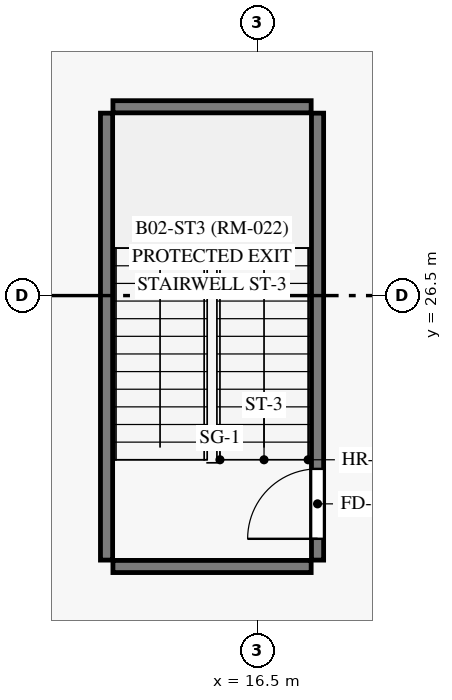
"""IFC4 building model, lengths in metres.
Left out: names, types, materials, properties, quantities, classifications, styles, units other than length and angle.
Written with IfcOpenShell. Run it as: python <this file> out.ifc"""

import sys

from ifc_helpers import new_model, si_unit, direction, frame, frame_2d, origin, origin_with_axes, place, context, subcontext, project, spatial, rectangle, extrude, source, transform, mapped, element, fill, save


model = new_model("IFC4")
c1 = context("Model", 3, precision=1e-05, world=origin(), true_north=direction((0.0, 1.0)))
c2 = subcontext(c1, "Body", "Model", "MODEL_VIEW")
j1 = project(units=[si_unit("LENGTHUNIT", "METRE"), si_unit("PLANEANGLEUNIT", "RADIAN")], contexts=[c1])
p1 = place(None, origin())
s1 = spatial("IfcSite", under=j1, at=p1, CompositionType="ELEMENT")
p2 = place(p1, origin())
s2 = spatial("IfcBuilding", under=s1, at=p2, CompositionType="ELEMENT")
p3 = place(p2, frame((0.0, 0.0, -8.4)))
s3 = spatial("IfcBuildingStorey", under=s2, at=p3, CompositionType="ELEMENT", Elevation=-8.4)
p4 = place(p3, frame((14.015, 22.15, 0.0), z_axis=(0.0, 0.0, 1.0), x_axis=(0.0, 1.0, 0.0)))
e1 = element("IfcWall", 1, at=p4, inside=s3, PredefinedType="SHEAR", context=c2, shape_type="SweptSolid", body=[
    extrude(rectangle(XDim=7.35, YDim=0.2, at=frame_2d((3.675, 0.0))), origin(), (0.0, 0.0, 1.0), 3.85),
])
p5 = place(p3, frame((17.485, 22.15, 0.0), z_axis=(0.0, 0.0, 1.0), x_axis=(0.0, 1.0, 0.0)))
e2 = element("IfcWall", 2, at=p5, inside=s3, PredefinedType="SHEAR", context=c2, shape_type="SweptSolid", body=[
    extrude(rectangle(XDim=7.35, YDim=0.2, at=frame_2d((3.675, 0.0))), origin(), (0.0, 0.0, 1.0), 3.85),
])
p6 = place(p5, frame((0.35, 0.0, 0.0)))
e3 = element("IfcOpeningElement", 3, at=p6, cuts=e2, PredefinedType="OPENING", context=c2, shape_type="SweptSolid", body=[
    extrude(rectangle(XDim=1.15, YDim=2.15, at=frame_2d((0.575, 1.075))), frame((0.0, 0.11, 0.0), z_axis=(0.0, -1.0, 0.0), x_axis=(1.0, 0.0, 0.0)), (0.0, 0.0, 1.0), 0.22),
])
for number, where, z_axis, x_axis in (
    (4, (14.12, 22.045, 0.0), (0.0, 0.0, 1.0), (1.0, 0.0, 0.0)),
    (5, (14.12, 29.605, 0.0), (0.0, 0.0, 1.0), (1.0, 0.0, 0.0)),
):
    element("IfcWall", number, at=place(p3, frame(where, z_axis=z_axis, x_axis=x_axis)), inside=s3, PredefinedType="SHEAR", context=c2, shape_type="SweptSolid", body=[
        extrude(rectangle(XDim=3.26, YDim=0.2, at=frame_2d((1.63, 0.0))), origin(), (0.0, 0.0, 1.0), 3.85),
    ])
m1 = source(origin_with_axes(), c2, "Body", "SweptSolid", [
    extrude(rectangle(XDim=1.15, YDim=2.15, at=frame_2d((0.575, 1.075))), frame((0.0, 0.025, 0.0), z_axis=(0.0, -1.0, 0.0), x_axis=(1.0, 0.0, 0.0)), (0.0, 0.0, 1.0), 0.05),
])
p7 = place(p6, origin())
e6 = element("IfcDoor", 6, at=p7, inside=s3, OperationType="SINGLE_SWING_LEFT", PredefinedType="DOOR", context=c2, shape_type="MappedRepresentation", body=[
    mapped(m1, transform((0.0, 0.0, 0.0), scale=1.0)),
])
fill(e3, e6)
save(model, sys.argv[1])
